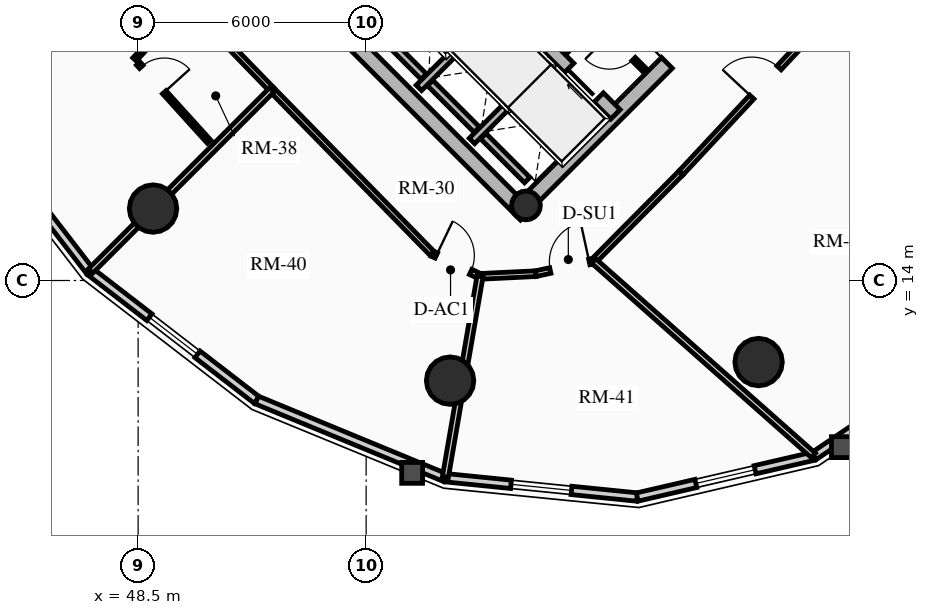
"""IFC4 building model, lengths in metres.
Left out: names, types, materials, properties, quantities, classifications, styles, units other than length and angle.
Written with IfcOpenShell. Run it as: python <this file> out.ifc"""

import sys

from ifc_helpers import new_model, si_unit, direction, frame, frame_2d, origin, origin_2d, place, context, subcontext, project, spatial, rectangle, circle, hollow_circle, extrude, source, transform, mapped, element, fill, save


model = new_model("IFC4")
c1 = context("Model", 3, precision=1e-05, world=origin(), true_north=direction((0.0, 1.0)))
c2 = subcontext(c1, "Body", "Model", "MODEL_VIEW")
j1 = project(units=[si_unit("LENGTHUNIT", "METRE"), si_unit("PLANEANGLEUNIT", "RADIAN")], contexts=[c1])
p1 = place(None, origin())
s1 = spatial("IfcSite", under=j1, at=p1, CompositionType="ELEMENT")
p2 = place(p1, origin())
s2 = spatial("IfcBuilding", under=s1, at=p2, CompositionType="ELEMENT")
p3 = place(p2, frame((0.0, 0.0, 157.42)))
s3 = spatial("IfcBuildingStorey", under=s2, at=p3, CompositionType="ELEMENT", Elevation=157.42)
p4 = place(p3, frame((58.702, 15.732, 0.0), z_axis=(0.0, 0.0, 1.0), x_axis=(-0.707106781187, 0.707106781187, 0.0)))
e1 = element("IfcWall", 1, at=p4, inside=s3, PredefinedType="SHEAR", context=c2, shape_type="SweptSolid", body=[
    extrude(rectangle(XDim=14.1, YDim=0.4, at=frame_2d((7.05, 0.0))), origin(), (0.0, 0.0, 1.0), 2.91),
])
p5 = place(p3, frame((58.561, 15.873, 0.0), z_axis=(0.0, 0.0, 1.0), x_axis=(0.707106781187, 0.707106781187, 0.0)))
e2 = element("IfcWall", 2, at=p5, inside=s3, PredefinedType="SHEAR", context=c2, shape_type="SweptSolid", body=[
    extrude(rectangle(XDim=10.7, YDim=0.4, at=frame_2d((5.35, 0.0))), origin(), (0.0, 0.0, 1.0), 2.91),
])
m1 = source(origin(), c2, "Body", "SweptSolid", [
    extrude(rectangle(XDim=1.5, YDim=2.02, at=frame_2d((0.75, 1.01))), frame((0.0, 0.21, 0.0), z_axis=(0.0, -1.0, 0.0), x_axis=(1.0, 0.0, 0.0)), (0.0, 0.0, 1.0), 0.42),
])
p6 = place(p5, frame((5.45, 0.0, 0.0)))
e3 = element("IfcOpeningElement", 3, at=p6, cuts=e2, PredefinedType="OPENING", context=c2, shape_type="MappedRepresentation", body=[
    mapped(m1, transform((0.0, 0.0, 0.0), x_axis=(1.0, 0.0, 0.0), y_axis=(0.0, 1.0, 0.0), z_axis=(0.0, 0.0, 1.0), scale=1.0)),
])
p7 = place(p3, frame((61.06, 18.373, 0.0), z_axis=(0.0, 0.0, 1.0), x_axis=(-0.707106781187, 0.707106781187, 0.0)))
e4 = element("IfcWall", 4, at=p7, inside=s3, PredefinedType="SHEAR", context=c2, shape_type="SweptSolid", body=[
    extrude(rectangle(XDim=13.7, YDim=0.35, at=frame_2d((6.85, 0.0))), origin(), (0.0, 0.0, 1.0), 2.91),
])
m2 = source(origin(), c2, "Body", "SweptSolid", [
    extrude(rectangle(XDim=1.1, YDim=2.015, at=frame_2d((0.55, 1.007))), frame((0.0, 0.185, 0.0), z_axis=(0.0, -1.0, 0.0), x_axis=(1.0, 0.0, 0.0)), (0.0, 0.0, 1.0), 0.37),
])
p8 = place(p7, frame((4.85, 0.0, 0.0)))
e5 = element("IfcOpeningElement", 5, at=p8, cuts=e4, PredefinedType="OPENING", context=c2, shape_type="MappedRepresentation", body=[
    mapped(m2, transform((0.0, 0.0, 0.0), x_axis=(1.0, 0.0, 0.0), y_axis=(0.0, 1.0, 0.0), z_axis=(0.0, 0.0, 1.0), scale=1.0)),
])
p9 = place(p7, frame((0.625, 0.0, 0.0)))
e6 = element("IfcOpeningElement", 6, at=p9, cuts=e4, PredefinedType="OPENING", context=c2, shape_type="MappedRepresentation", body=[
    mapped(m2, transform((0.0, 0.0, 0.0), x_axis=(1.0, 0.0, 0.0), y_axis=(0.0, 1.0, 0.0), z_axis=(0.0, 0.0, 1.0), scale=1.0)),
])
p10 = place(p7, frame((2.625, 0.0, 0.0)))
e7 = element("IfcOpeningElement", 7, at=p10, cuts=e4, PredefinedType="OPENING", context=c2, shape_type="MappedRepresentation", body=[
    mapped(m2, transform((0.0, 0.0, 0.0), x_axis=(1.0, 0.0, 0.0), y_axis=(0.0, 1.0, 0.0), z_axis=(0.0, 0.0, 1.0), scale=1.0)),
])
m3 = source(origin(), c2, "Body", "SweptSolid", [
    extrude(rectangle(XDim=1.15, YDim=2.02, at=frame_2d((0.575, 1.01))), frame((0.0, 0.185, 0.0), z_axis=(0.0, -1.0, 0.0), x_axis=(1.0, 0.0, 0.0)), (0.0, 0.0, 1.0), 0.37),
])
p11 = place(p7, frame((7.27, 0.0, 0.0)))
e8 = element("IfcOpeningElement", 8, at=p11, cuts=e4, PredefinedType="OPENING", context=c2, shape_type="MappedRepresentation", body=[
    mapped(m3, transform((0.0, 0.0, 0.0), x_axis=(1.0, 0.0, 0.0), y_axis=(0.0, 1.0, 0.0), z_axis=(0.0, 0.0, 1.0), scale=1.0)),
])
p12 = place(p3, frame((58.706, 15.976, 0.0), z_axis=(0.0, 0.0, 1.0), x_axis=(0.707106781187, 0.707106781187, 0.0)))
e9 = element("IfcColumn", 9, at=p12, inside=s3, PredefinedType="COLUMN", context=c2, shape_type="SweptSolid", body=[
    extrude(hollow_circle(Radius=0.38, WallThickness=0.032, at=origin_2d()), origin(), (0.0, 0.0, 1.0), 2.91),
])
for number, where, z_axis, x_axis in (
    (10, (48.893, 15.893, 0.0), (0.0, 0.0, 1.0), (1.0, 0.0, 0.0)),
    (11, (56.709, 11.365, 0.0), (0.0, 0.0, 1.0), (1.0, 0.0, 0.0)),
    (12, (64.827, 11.854, 0.0), (0.0, 0.0, 1.0), (1.0, 0.0, 0.0)),
):
    element("IfcColumn", number, at=place(p3, frame(where, z_axis=z_axis, x_axis=x_axis)), inside=s3, PredefinedType="USERDEFINED", context=c2, shape_type="SweptSolid", body=[
        extrude(circle(Radius=0.625, at=origin_2d()), origin(), (0.0, 0.0, 1.0), 2.91),
    ])
p13 = place(p3, frame((47.236, 14.236, 0.0), z_axis=(0.0, 0.0, 1.0), x_axis=(-0.610543584779, 0.791982658323, 0.0)))
e13 = element("IfcWall", 13, at=p13, inside=s3, PredefinedType="SOLIDWALL", context=c2, shape_type="SweptSolid", body=[
    extrude(rectangle(XDim=5.537, YDim=0.22, at=frame_2d((2.769, 0.0))), origin(), (0.0, 0.0, 1.0), 2.245),
])
p14 = place(p3, frame((51.622, 10.856, 0.0), z_axis=(0.0, 0.0, 1.0), x_axis=(-0.791982658323, 0.610543584779, 0.0)))
e14 = element("IfcWall", 14, at=p14, inside=s3, PredefinedType="SOLIDWALL", context=c2, shape_type="SweptSolid", body=[
    extrude(rectangle(XDim=5.537, YDim=0.22, at=frame_2d((2.769, 0.0))), origin(), (0.0, 0.0, 1.0), 2.245),
])
m4 = source(origin(), c2, "Body", "SweptSolid", [
    extrude(rectangle(XDim=1.6, YDim=1.3, at=frame_2d((0.8, 0.65))), frame((0.0, 0.12, 0.0), z_axis=(0.0, -1.0, 0.0), x_axis=(1.0, 0.0, 0.0)), (0.0, 0.0, 1.0), 0.24),
])
p15 = place(p14, frame((1.968, 0.0, 0.65)))
e15 = element("IfcOpeningElement", 15, at=p15, cuts=e14, PredefinedType="OPENING", context=c2, shape_type="MappedRepresentation", body=[
    mapped(m4, transform((0.0, 0.0, 0.0), x_axis=(1.0, 0.0, 0.0), y_axis=(0.0, 1.0, 0.0), z_axis=(0.0, 0.0, 1.0), scale=1.0)),
])
p16 = place(p3, frame((56.582, 8.811, 0.0), z_axis=(0.0, 0.0, 1.0), x_axis=(-0.924528197738, 0.38111364655, 0.0)))
e16 = element("IfcWall", 16, at=p16, inside=s3, PredefinedType="SOLIDWALL", context=c2, shape_type="SweptSolid", body=[
    extrude(rectangle(XDim=5.366, YDim=0.22, at=frame_2d((2.683, 0.0))), origin(), (0.0, 0.0, 1.0), 2.245),
])
p17 = place(p3, frame((61.633, 8.302, 0.0), z_axis=(0.0, 0.0, 1.0), x_axis=(-0.994959267396, 0.100279889424, 0.0)))
e17 = element("IfcWall", 17, at=p17, inside=s3, PredefinedType="SOLIDWALL", context=c2, shape_type="SweptSolid", body=[
    extrude(rectangle(XDim=5.076, YDim=0.22, at=frame_2d((2.538, 0.0))), origin(), (0.0, 0.0, 1.0), 2.245),
])
p18 = place(p17, frame((1.738, 0.0, 0.65)))
e18 = element("IfcOpeningElement", 18, at=p18, cuts=e17, PredefinedType="OPENING", context=c2, shape_type="MappedRepresentation", body=[
    mapped(m4, transform((0.0, 0.0, 0.0), x_axis=(1.0, 0.0, 0.0), y_axis=(0.0, 1.0, 0.0), z_axis=(0.0, 0.0, 1.0), scale=1.0)),
])
p19 = place(p3, frame((66.279, 9.378, 0.0), z_axis=(0.0, 0.0, 1.0), x_axis=(-0.974206226622, -0.225659540039, 0.0)))
e19 = element("IfcWall", 19, at=p19, inside=s3, PredefinedType="SOLIDWALL", context=c2, shape_type="SweptSolid", body=[
    extrude(rectangle(XDim=4.769, YDim=0.22, at=frame_2d((2.385, 0.0))), origin(), (0.0, 0.0, 1.0), 2.245),
])
p20 = place(p19, frame((1.585, 0.0, 0.65)))
e20 = element("IfcOpeningElement", 20, at=p20, cuts=e19, PredefinedType="OPENING", context=c2, shape_type="MappedRepresentation", body=[
    mapped(m4, transform((0.0, 0.0, 0.0), x_axis=(1.0, 0.0, 0.0), y_axis=(0.0, 1.0, 0.0), z_axis=(0.0, 0.0, 1.0), scale=1.0)),
])
p21 = place(p3, frame((70.065, 11.935, 0.0), z_axis=(0.0, 0.0, 1.0), x_axis=(-0.828739009952, -0.559635286042, 0.0)))
e21 = element("IfcWall", 21, at=p21, inside=s3, PredefinedType="SOLIDWALL", context=c2, shape_type="SweptSolid", body=[
    extrude(rectangle(XDim=4.569, YDim=0.22, at=frame_2d((2.284, 0.0))), origin(), (0.0, 0.0, 1.0), 2.245),
])
p22 = place(p3, frame((55.888, 19.069, 0.0), z_axis=(0.0, 0.0, 1.0), x_axis=(0.707106781187, 0.707106781187, 0.0)))
e22 = element("IfcWall", 22, at=p22, inside=s3, PredefinedType="SHEAR", context=c2, shape_type="SweptSolid", body=[
    extrude(rectangle(XDim=2.97, YDim=0.2, at=frame_2d((1.485, 0.0))), origin(), (0.0, 0.0, 1.0), 2.91),
])
p23 = place(p3, frame((56.015, 19.366, 0.0), z_axis=(0.0, 0.0, 1.0), x_axis=(-0.707106781187, 0.707106781187, 0.0)))
e23 = element("IfcWall", 23, at=p23, inside=s3, PredefinedType="SHEAR", context=c2, shape_type="SweptSolid", body=[
    extrude(rectangle(XDim=2.44, YDim=0.2, at=frame_2d((1.22, 0.0))), origin(), (0.0, 0.0, 1.0), 2.91),
])
p24 = place(p3, frame((57.284, 17.673, 0.0), z_axis=(0.0, 0.0, 1.0), x_axis=(0.707147878904, 0.70706568108, 0.0)))
e24 = element("IfcWall", 24, at=p24, inside=s3, PredefinedType="SHEAR", context=c2, shape_type="SweptSolid", body=[
    extrude(rectangle(XDim=2.97, YDim=0.2, at=frame_2d((1.485, 0.0))), origin(), (0.0, 0.0, 1.0), 2.91),
])
p25 = place(p3, frame((57.412, 17.97, 0.0), z_axis=(0.0, 0.0, 1.0), x_axis=(-0.707106781187, 0.707106781187, 0.0)))
e25 = element("IfcWall", 25, at=p25, inside=s3, PredefinedType="SHEAR", context=c2, shape_type="SweptSolid", body=[
    extrude(rectangle(XDim=1.735, YDim=0.2, at=frame_2d((0.867, 0.0))), origin(), (0.0, 0.0, 1.0), 2.91),
])
p26 = place(p3, frame((58.737, 16.644, 0.0), z_axis=(0.0, 0.0, 1.0), x_axis=(-0.707032117043, 0.707181437447, 0.0)))
e26 = element("IfcWall", 26, at=p26, inside=s3, PredefinedType="SHEAR", context=c2, shape_type="SweptSolid", body=[
    extrude(rectangle(XDim=1.635, YDim=0.2, at=frame_2d((0.817, 0.0))), origin(), (0.0, 0.0, 1.0), 2.91),
])
p27 = place(p3, frame((61.835, 19.529, 0.0), z_axis=(0.0, 0.0, 1.0), x_axis=(-0.707174592913, 0.707038962956, 0.0)))
e27 = element("IfcWall", 27, at=p27, inside=s3, PredefinedType="PARTITIONING", context=c2, shape_type="SweptSolid", body=[
    extrude(rectangle(XDim=1.8, YDim=0.125, at=frame_2d((0.9, 0.0))), origin(), (0.0, 0.0, 1.0), 2.675),
])
m5 = source(origin(), c2, "Body", "SweptSolid", [
    extrude(rectangle(XDim=0.9, YDim=2.005, at=frame_2d((0.45, 1.002))), frame((0.0, 0.073, 0.0), z_axis=(0.0, -1.0, 0.0), x_axis=(1.0, 0.0, 0.0)), (0.0, 0.0, 1.0), 0.145),
])
p28 = place(p27, frame((0.42, 0.0, 0.0)))
e28 = element("IfcOpeningElement", 28, at=p28, cuts=e27, PredefinedType="OPENING", context=c2, shape_type="MappedRepresentation", body=[
    mapped(m5, transform((0.0, 0.0, 0.0), x_axis=(1.0, 0.0, 0.0), y_axis=(0.0, 1.0, 0.0), z_axis=(0.0, 0.0, 1.0), scale=1.0)),
])
p29 = place(p3, frame((59.713, 19.996, 0.0), z_axis=(0.0, 0.0, 1.0), x_axis=(0.707217726, 0.706995818963, 0.0)))
e29 = element("IfcWall", 29, at=p29, inside=s3, PredefinedType="PARTITIONING", context=c2, shape_type="SweptSolid", body=[
    extrude(rectangle(XDim=1.1, YDim=0.125, at=frame_2d((0.55, 0.0))), origin(), (0.0, 0.0, 1.0), 2.675),
])
p30 = place(p3, frame((47.901, 23.265, 0.0), z_axis=(0.0, 0.0, 1.0), x_axis=(0.696355965374, -0.717696572019, 0.0)))
e30 = element("IfcWall", 30, at=p30, inside=s3, PredefinedType="PARTITIONING", context=c2, shape_type="SweptSolid", body=[
    extrude(rectangle(XDim=5.915, YDim=0.15, at=frame_2d((2.957, 0.0))), origin(), (0.0, 0.0, 1.0), 2.675),
])
p31 = place(p3, frame((52.02, 19.02, 0.0), z_axis=(0.0, 0.0, 1.0), x_axis=(0.699456449804, -0.71467522332, 0.0)))
e31 = element("IfcWall", 31, at=p31, inside=s3, PredefinedType="PARTITIONING", context=c2, shape_type="SweptSolid", body=[
    extrude(rectangle(XDim=6.032, YDim=0.15, at=frame_2d((3.016, 0.0))), origin(), (0.0, 0.0, 1.0), 2.245),
])
p32 = place(p3, frame((56.239, 14.709, 0.0), z_axis=(0.0, 0.0, 1.0), x_axis=(0.902374219125, -0.430953325383, 0.0)))
e32 = element("IfcWall", 32, at=p32, inside=s3, PredefinedType="PARTITIONING", context=c2, shape_type="SweptSolid", body=[
    extrude(rectangle(XDim=1.394, YDim=0.15, at=frame_2d((0.697, 0.0))), origin(), (0.0, 0.0, 1.0), 2.245),
])
m6 = source(origin(), c2, "Body", "SweptSolid", [
    extrude(rectangle(XDim=1.0, YDim=2.015, at=frame_2d((0.5, 1.007))), frame((0.0, 0.085, 0.0), z_axis=(0.0, -1.0, 0.0), x_axis=(1.0, 0.0, 0.0)), (0.0, 0.0, 1.0), 0.17),
])
p33 = place(p32, frame((0.12, 0.0, 0.0)))
e33 = element("IfcOpeningElement", 33, at=p33, cuts=e32, PredefinedType="OPENING", context=c2, shape_type="MappedRepresentation", body=[
    mapped(m6, transform((0.0, 0.0, 0.0), x_axis=(1.0, 0.0, 0.0), y_axis=(0.0, 1.0, 0.0), z_axis=(0.0, 0.0, 1.0), scale=1.0)),
])
p34 = place(p3, frame((57.497, 14.109, 0.0), z_axis=(0.0, 0.0, 1.0), x_axis=(0.998828286318, 0.048394777109, 0.0)))
e34 = element("IfcWall", 34, at=p34, inside=s3, PredefinedType="PARTITIONING", context=c2, shape_type="SweptSolid", body=[
    extrude(rectangle(XDim=1.468, YDim=0.15, at=frame_2d((0.734, 0.0))), origin(), (0.0, 0.0, 1.0), 2.245),
])
p35 = place(p3, frame((58.963, 14.18, 0.0), z_axis=(0.0, 0.0, 1.0), x_axis=(0.976826524015, 0.214032572243, 0.0)))
e35 = element("IfcWall", 35, at=p35, inside=s3, PredefinedType="PARTITIONING", context=c2, shape_type="SweptSolid", body=[
    extrude(rectangle(XDim=1.562, YDim=0.15, at=frame_2d((0.781, 0.0))), origin(), (0.0, 0.0, 1.0), 2.245),
])
m7 = source(origin(), c2, "Body", "SweptSolid", [
    extrude(rectangle(XDim=1.05, YDim=2.015, at=frame_2d((0.525, 1.007))), frame((0.0, 0.085, 0.0), z_axis=(0.0, -1.0, 0.0), x_axis=(1.0, 0.0, 0.0)), (0.0, 0.0, 1.0), 0.17),
])
p36 = place(p35, frame((0.392, 0.0, 0.0)))
e36 = element("IfcOpeningElement", 36, at=p36, cuts=e35, PredefinedType="OPENING", context=c2, shape_type="MappedRepresentation", body=[
    mapped(m7, transform((0.0, 0.0, 0.0), x_axis=(1.0, 0.0, 0.0), y_axis=(0.0, 1.0, 0.0), z_axis=(0.0, 0.0, 1.0), scale=1.0)),
])
p37 = place(p3, frame((60.488, 14.514, 0.0), z_axis=(0.0, 0.0, 1.0), x_axis=(0.703880260405, 0.71031864611, 0.0)))
e37 = element("IfcWall", 37, at=p37, inside=s3, PredefinedType="PARTITIONING", context=c2, shape_type="SweptSolid", body=[
    extrude(rectangle(XDim=3.261, YDim=0.15, at=frame_2d((1.63, 0.0))), origin(), (0.0, 0.0, 1.0), 2.245),
])
p38 = place(p3, frame((62.784, 16.83, 0.0), z_axis=(0.0, 0.0, 1.0), x_axis=(0.682240832942, 0.731127516831, 0.0)))
e38 = element("IfcWall", 38, at=p38, inside=s3, PredefinedType="PARTITIONING", context=c2, shape_type="SweptSolid", body=[
    extrude(rectangle(XDim=6.517, YDim=0.15, at=frame_2d((3.259, 0.0))), origin(), (0.0, 0.0, 1.0), 2.245),
])
p39 = place(p38, frame((2.734, 0.0, 0.0)))
e39 = element("IfcOpeningElement", 39, at=p39, cuts=e38, PredefinedType="OPENING", context=c2, shape_type="MappedRepresentation", body=[
    mapped(m7, transform((0.0, 0.0, 0.0), x_axis=(1.0, 0.0, 0.0), y_axis=(0.0, 1.0, 0.0), z_axis=(0.0, 0.0, 1.0), scale=1.0)),
])
p40 = place(p3, frame((52.02, 19.02, 0.0), z_axis=(0.0, 0.0, 1.0), x_axis=(-0.707106781187, -0.707106781187, 0.0)))
e40 = element("IfcWall", 40, at=p40, inside=s3, PredefinedType="PARTITIONING", context=c2, shape_type="SweptSolid", body=[
    extrude(rectangle(XDim=6.745, YDim=0.16, at=frame_2d((3.373, 0.0))), origin(), (0.0, 0.0, 1.0), 2.245),
])
p41 = place(p3, frame((57.497, 14.109, 0.0), z_axis=(0.0, 0.0, 1.0), x_axis=(-0.170109923992, -0.985425092922, 0.0)))
e41 = element("IfcWall", 41, at=p41, inside=s3, PredefinedType="PARTITIONING", context=c2, shape_type="SweptSolid", body=[
    extrude(rectangle(XDim=5.356, YDim=0.16, at=frame_2d((2.678, 0.0))), origin(), (0.0, 0.0, 1.0), 2.245),
])
p42 = place(p3, frame((60.488, 14.514, 0.0), z_axis=(0.0, 0.0, 1.0), x_axis=(0.748740614849, -0.662863101761, 0.0)))
e42 = element("IfcWall", 42, at=p42, inside=s3, PredefinedType="PARTITIONING", context=c2, shape_type="SweptSolid", body=[
    extrude(rectangle(XDim=7.721, YDim=0.16, at=frame_2d((3.861, 0.0))), origin(), (0.0, 0.0, 1.0), 2.245),
])
p43 = place(p3, frame((67.23, 21.595, 0.0), z_axis=(0.0, 0.0, 1.0), x_axis=(0.67560509773, -0.737263692258, 0.0)))
e43 = element("IfcWall", 43, at=p43, inside=s3, PredefinedType="PARTITIONING", context=c2, shape_type="SweptSolid", body=[
    extrude(rectangle(XDim=7.955, YDim=0.16, at=frame_2d((3.978, 0.0))), origin(), (0.0, 0.0, 1.0), 2.245),
])
p44 = place(p3, frame((49.665, 21.171, 0.0), z_axis=(0.0, 0.0, 1.0), x_axis=(-0.681089123144, -0.73220052331, 0.0)))
e44 = element("IfcWall", 44, at=p44, inside=s3, PredefinedType="PARTITIONING", context=c2, shape_type="SweptSolid", body=[
    extrude(rectangle(XDim=1.849, YDim=0.125, at=frame_2d((0.924, 0.0))), origin(), (0.0, 0.0, 1.0), 2.675),
])
p45 = place(p3, frame((48.503, 19.711, 0.0), z_axis=(0.0, 0.0, 1.0), x_axis=(0.671201050003, -0.741275354018, 0.0)))
e45 = element("IfcWall", 45, at=p45, inside=s3, PredefinedType="PARTITIONING", context=c2, shape_type="SweptSolid", body=[
    extrude(rectangle(XDim=2.777, YDim=0.125, at=frame_2d((1.388, 0.0))), origin(), (0.0, 0.0, 1.0), 2.675),
])
p46 = place(p45, frame((0.12, 0.0, 0.0)))
e46 = element("IfcOpeningElement", 46, at=p46, cuts=e45, PredefinedType="OPENING", context=c2, shape_type="MappedRepresentation", body=[
    mapped(m5, transform((0.0, 0.0, 0.0), x_axis=(1.0, 0.0, 0.0), y_axis=(0.0, 1.0, 0.0), z_axis=(0.0, 0.0, 1.0), scale=1.0)),
])
m8 = source(origin(), c2, "Body", "SweptSolid", [
    extrude(rectangle(XDim=1.6, YDim=1.3, at=frame_2d((0.8, 0.65))), frame((0.0, 0.03, 0.0), z_axis=(0.0, -1.0, 0.0), x_axis=(1.0, 0.0, 0.0)), (0.0, 0.0, 1.0), 0.06),
])
p47 = place(p15, origin())
e47 = element("IfcWindow", 47, at=p47, inside=s3, PartitioningType="SINGLE_PANEL", PredefinedType="WINDOW", context=c2, shape_type="MappedRepresentation", body=[
    mapped(m8, transform((0.0, 0.0, 0.0), x_axis=(1.0, 0.0, 0.0), y_axis=(0.0, 1.0, 0.0), z_axis=(0.0, 0.0, 1.0), scale=1.0)),
])
fill(e15, e47)
p48 = place(p18, origin())
e48 = element("IfcWindow", 48, at=p48, inside=s3, PartitioningType="SINGLE_PANEL", PredefinedType="WINDOW", context=c2, shape_type="MappedRepresentation", body=[
    mapped(m8, transform((0.0, 0.0, 0.0), x_axis=(1.0, 0.0, 0.0), y_axis=(0.0, 1.0, 0.0), z_axis=(0.0, 0.0, 1.0), scale=1.0)),
])
fill(e18, e48)
p49 = place(p20, origin())
e49 = element("IfcWindow", 49, at=p49, inside=s3, PartitioningType="SINGLE_PANEL", PredefinedType="WINDOW", context=c2, shape_type="MappedRepresentation", body=[
    mapped(m8, transform((0.0, 0.0, 0.0), x_axis=(1.0, 0.0, 0.0), y_axis=(0.0, 1.0, 0.0), z_axis=(0.0, 0.0, 1.0), scale=1.0)),
])
fill(e20, e49)
m9 = source(origin(), c2, "Body", "SweptSolid", [
    extrude(rectangle(XDim=1.1, YDim=2.015, at=frame_2d((0.55, 1.007))), frame((0.0, 0.025, 0.0), z_axis=(0.0, -1.0, 0.0), x_axis=(1.0, 0.0, 0.0)), (0.0, 0.0, 1.0), 0.05),
])
p50 = place(p9, origin())
e50 = element("IfcDoor", 50, at=p50, inside=s3, OperationType="SLIDING_TO_RIGHT", PredefinedType="DOOR", context=c2, shape_type="MappedRepresentation", body=[
    mapped(m9, transform((0.0, 0.0, 0.0), x_axis=(1.0, 0.0, 0.0), y_axis=(0.0, 1.0, 0.0), z_axis=(0.0, 0.0, 1.0), scale=1.0)),
])
fill(e6, e50)
m10 = source(origin(), c2, "Body", "SweptSolid", [
    extrude(rectangle(XDim=1.5, YDim=2.02, at=frame_2d((0.75, 1.01))), frame((0.0, 0.025, 0.0), z_axis=(0.0, -1.0, 0.0), x_axis=(1.0, 0.0, 0.0)), (0.0, 0.0, 1.0), 0.05),
])
p51 = place(p6, origin())
e51 = element("IfcDoor", 51, at=p51, inside=s3, OperationType="DOUBLE_DOOR_SINGLE_SWING", PredefinedType="DOOR", context=c2, shape_type="MappedRepresentation", body=[
    mapped(m10, transform((0.0, 0.0, 0.0), x_axis=(1.0, 0.0, 0.0), y_axis=(0.0, 1.0, 0.0), z_axis=(0.0, 0.0, 1.0), scale=1.0)),
])
fill(e3, e51)
m11 = source(origin(), c2, "Body", "SweptSolid", [
    extrude(rectangle(XDim=0.9, YDim=2.005, at=frame_2d((0.45, 1.002))), frame((0.0, 0.025, 0.0), z_axis=(0.0, -1.0, 0.0), x_axis=(1.0, 0.0, 0.0)), (0.0, 0.0, 1.0), 0.05),
])
p52 = place(p28, origin())
e52 = element("IfcDoor", 52, at=p52, inside=s3, OperationType="SINGLE_SWING_RIGHT", PredefinedType="DOOR", context=c2, shape_type="MappedRepresentation", body=[
    mapped(m11, transform((0.0, 0.0, 0.0), x_axis=(1.0, 0.0, 0.0), y_axis=(0.0, 1.0, 0.0), z_axis=(0.0, 0.0, 1.0), scale=1.0)),
])
fill(e28, e52)
p53 = place(p46, origin())
e53 = element("IfcDoor", 53, at=p53, inside=s3, OperationType="SINGLE_SWING_RIGHT", PredefinedType="DOOR", context=c2, shape_type="MappedRepresentation", body=[
    mapped(m11, transform((0.0, 0.0, 0.0), x_axis=(1.0, 0.0, 0.0), y_axis=(0.0, 1.0, 0.0), z_axis=(0.0, 0.0, 1.0), scale=1.0)),
])
fill(e46, e53)
m12 = source(origin(), c2, "Body", "SweptSolid", [
    extrude(rectangle(XDim=1.0, YDim=2.015, at=frame_2d((0.5, 1.007))), frame((0.0, 0.025, 0.0), z_axis=(0.0, -1.0, 0.0), x_axis=(1.0, 0.0, 0.0)), (0.0, 0.0, 1.0), 0.05),
])
p54 = place(p33, origin())
e54 = element("IfcDoor", 54, at=p54, inside=s3, OperationType="SINGLE_SWING_LEFT", PredefinedType="DOOR", context=c2, shape_type="MappedRepresentation", body=[
    mapped(m12, transform((0.0, 0.0, 0.0), x_axis=(1.0, 0.0, 0.0), y_axis=(0.0, 1.0, 0.0), z_axis=(0.0, 0.0, 1.0), scale=1.0)),
])
fill(e33, e54)
m13 = source(origin(), c2, "Body", "SweptSolid", [
    extrude(rectangle(XDim=1.05, YDim=2.015, at=frame_2d((0.525, 1.007))), frame((0.0, 0.025, 0.0), z_axis=(0.0, -1.0, 0.0), x_axis=(1.0, 0.0, 0.0)), (0.0, 0.0, 1.0), 0.05),
])
p55 = place(p36, origin())
e55 = element("IfcDoor", 55, at=p55, inside=s3, OperationType="SINGLE_SWING_RIGHT", PredefinedType="DOOR", context=c2, shape_type="MappedRepresentation", body=[
    mapped(m13, transform((0.0, 0.0, 0.0), x_axis=(1.0, 0.0, 0.0), y_axis=(0.0, 1.0, 0.0), z_axis=(0.0, 0.0, 1.0), scale=1.0)),
])
fill(e36, e55)
p56 = place(p39, origin())
e56 = element("IfcDoor", 56, at=p56, inside=s3, OperationType="SINGLE_SWING_LEFT", PredefinedType="DOOR", context=c2, shape_type="MappedRepresentation", body=[
    mapped(m13, transform((0.0, 0.0, 0.0), x_axis=(1.0, 0.0, 0.0), y_axis=(0.0, 1.0, 0.0), z_axis=(0.0, 0.0, 1.0), scale=1.0)),
])
fill(e39, e56)
save(model, sys.argv[1])
